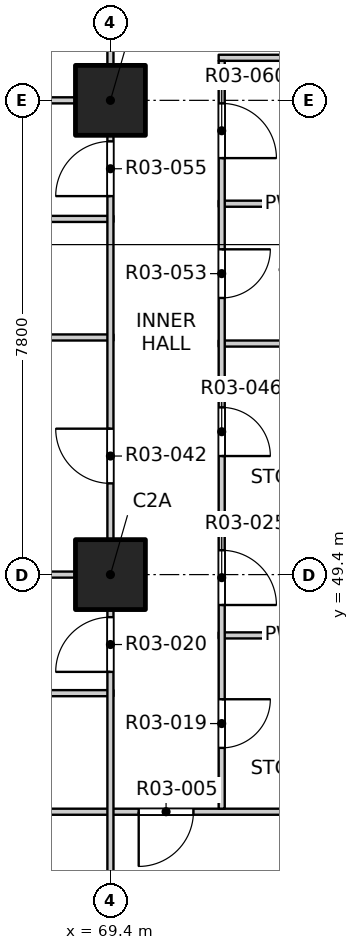
"""IFC4 building model, lengths in metres.
Left out: names, types, materials, properties, quantities, classifications, styles, units other than length and angle.
Written with IfcOpenShell. Run it as: python <this file> out.ifc"""

import sys

from ifc_helpers import new_model, si_unit, direction, frame, frame_2d, origin, origin_2d, place, context, subcontext, project, spatial, rectangle, extrude, element, fill, save


model = new_model("IFC4")
c1 = context("Model", 3, precision=1e-05, world=origin(), true_north=direction((0.0, 1.0)))
c2 = subcontext(c1, "Body", "Model", "MODEL_VIEW")
j1 = project(units=[si_unit("LENGTHUNIT", "METRE"), si_unit("PLANEANGLEUNIT", "RADIAN")], contexts=[c1])
p1 = place(None, origin())
s1 = spatial("IfcSite", under=j1, at=p1, CompositionType="ELEMENT")
p2 = place(p1, origin())
s2 = spatial("IfcBuilding", under=s1, at=p2, CompositionType="ELEMENT")
p3 = place(p2, frame((0.0, 0.0, 43.3)))
s3 = spatial("IfcBuildingStorey", under=s2, at=p3, CompositionType="ELEMENT", Elevation=43.3)
for number, where, z_axis, x_axis in (
    (1, (69.4, 49.4, -0.25), (0.0, 0.0, 1.0), (1.0, 0.0, 0.0)),
    (2, (69.4, 57.2, -0.25), (0.0, 0.0, 1.0), (1.0, 0.0, 0.0)),
):
    element("IfcColumn", number, at=place(p3, frame(where, z_axis=z_axis, x_axis=x_axis)), inside=s3, PredefinedType="COLUMN", context=c2, shape_type="SweptSolid", body=[
        extrude(rectangle(XDim=1.15, YDim=1.15, at=origin_2d()), origin(), (0.0, 0.0, 1.0), 3.35),
    ])
p4 = place(p3, frame((61.9, 45.5, 0.0), z_axis=(0.0, 0.0, 1.0), x_axis=(1.0, 0.0, 0.0)))
e3 = element("IfcWall", 3, at=p4, inside=s3, PredefinedType="PARTITIONING", context=c2, shape_type="SweptSolid", body=[
    extrude(rectangle(XDim=11.5, YDim=0.1, at=frame_2d((5.75, 0.0))), origin(), (0.0, 0.0, 1.0), 3.1),
])
p5 = place(p4, frame((7.965, 0.0, 0.0)))
e4 = element("IfcOpeningElement", 4, at=p5, cuts=e3, PredefinedType="OPENING", context=c2, shape_type="SweptSolid", body=[
    extrude(rectangle(XDim=0.9, YDim=2.1, at=frame_2d((0.45, 1.05))), frame((0.0, 0.06, 0.0), z_axis=(0.0, -1.0, 0.0), x_axis=(1.0, 0.0, 0.0)), (0.0, 0.0, 1.0), 0.12),
])
p6 = place(p3, frame((65.75, 47.45, 0.0), z_axis=(0.0, 0.0, 1.0), x_axis=(1.0, 0.0, 0.0)))
e5 = element("IfcWall", 5, at=p6, inside=s3, PredefinedType="PARTITIONING", context=c2, shape_type="SweptSolid", body=[
    extrude(rectangle(XDim=3.7, YDim=0.1, at=frame_2d((1.85, 0.0))), origin(), (0.0, 0.0, 1.0), 3.1),
])
p7 = place(p3, frame((71.18, 48.4, 0.0), z_axis=(0.0, 0.0, 1.0), x_axis=(1.0, 0.0, 0.0)))
e6 = element("IfcWall", 6, at=p7, inside=s3, PredefinedType="PARTITIONING", context=c2, shape_type="SweptSolid", body=[
    extrude(rectangle(XDim=2.22, YDim=0.1, at=frame_2d((1.11, 0.0))), origin(), (0.0, 0.0, 1.0), 3.1),
])
p8 = place(p3, frame((61.9, 49.4, 0.0), z_axis=(0.0, 0.0, 1.0), x_axis=(1.0, 0.0, 0.0)))
e7 = element("IfcWall", 7, at=p8, inside=s3, PredefinedType="PARTITIONING", context=c2, shape_type="SweptSolid", body=[
    extrude(rectangle(XDim=7.55, YDim=0.1, at=frame_2d((3.775, 0.0))), origin(), (0.0, 0.0, 1.0), 3.1),
])
p9 = place(p3, frame((71.18, 50.3, 0.0), z_axis=(0.0, 0.0, 1.0), x_axis=(1.0, 0.0, 0.0)))
e8 = element("IfcWall", 8, at=p9, inside=s3, PredefinedType="PARTITIONING", context=c2, shape_type="SweptSolid", body=[
    extrude(rectangle(XDim=2.22, YDim=0.1, at=frame_2d((1.11, 0.0))), origin(), (0.0, 0.0, 1.0), 3.1),
])
p10 = place(p3, frame((71.18, 53.2, 0.0), z_axis=(0.0, 0.0, 1.0), x_axis=(1.0, 0.0, 0.0)))
e9 = element("IfcWall", 9, at=p10, inside=s3, PredefinedType="PARTITIONING", context=c2, shape_type="SweptSolid", body=[
    extrude(rectangle(XDim=2.02, YDim=0.1, at=frame_2d((1.01, 0.0))), origin(), (0.0, 0.0, 1.0), 3.1),
])
p11 = place(p3, frame((61.9, 53.3, 0.0), z_axis=(0.0, 0.0, 1.0), x_axis=(1.0, 0.0, 0.0)))
e10 = element("IfcWall", 10, at=p11, inside=s3, PredefinedType="PARTITIONING", context=c2, shape_type="SweptSolid", body=[
    extrude(rectangle(XDim=7.55, YDim=0.1, at=frame_2d((3.775, 0.0))), origin(), (0.0, 0.0, 1.0), 3.1),
])
p12 = place(p3, frame((65.75, 55.25, 0.0), z_axis=(0.0, 0.0, 1.0), x_axis=(1.0, 0.0, 0.0)))
e11 = element("IfcWall", 11, at=p12, inside=s3, PredefinedType="PARTITIONING", context=c2, shape_type="SweptSolid", body=[
    extrude(rectangle(XDim=3.7, YDim=0.1, at=frame_2d((1.85, 0.0))), origin(), (0.0, 0.0, 1.0), 3.1),
])
p13 = place(p3, frame((71.18, 55.5, 0.0), z_axis=(0.0, 0.0, 1.0), x_axis=(1.0, 0.0, 0.0)))
e12 = element("IfcWall", 12, at=p13, inside=s3, PredefinedType="PARTITIONING", context=c2, shape_type="SweptSolid", body=[
    extrude(rectangle(XDim=2.22, YDim=0.1, at=frame_2d((1.11, 0.0))), origin(), (0.0, 0.0, 1.0), 3.1),
])
p14 = place(p3, frame((61.9, 57.2, 0.0), z_axis=(0.0, 0.0, 1.0), x_axis=(1.0, 0.0, 0.0)))
e13 = element("IfcWall", 13, at=p14, inside=s3, PredefinedType="PARTITIONING", context=c2, shape_type="SweptSolid", body=[
    extrude(rectangle(XDim=7.55, YDim=0.1, at=frame_2d((3.775, 0.0))), origin(), (0.0, 0.0, 1.0), 3.1),
])
p15 = place(p3, frame((71.18, 57.9, 0.0), z_axis=(0.0, 0.0, 1.0), x_axis=(1.0, 0.0, 0.0)))
e14 = element("IfcWall", 14, at=p15, inside=s3, PredefinedType="PARTITIONING", context=c2, shape_type="SweptSolid", body=[
    extrude(rectangle(XDim=2.22, YDim=0.1, at=frame_2d((1.11, 0.0))), origin(), (0.0, 0.0, 1.0), 3.1),
])
p16 = place(p3, frame((69.4, 41.9, 0.0), z_axis=(0.0, 0.0, 1.0), x_axis=(0.0, 1.0, 0.0)))
e15 = element("IfcWall", 15, at=p16, inside=s3, PredefinedType="PARTITIONING", context=c2, shape_type="SweptSolid", body=[
    extrude(rectangle(XDim=46.2, YDim=0.1, at=frame_2d((23.1, 0.0))), origin(), (0.0, 0.0, 1.0), 3.1),
])
p17 = place(p16, frame((1.2, 0.0, 0.0)))
e16 = element("IfcOpeningElement", 16, at=p17, cuts=e15, PredefinedType="OPENING", context=c2, shape_type="SweptSolid", body=[
    extrude(rectangle(XDim=0.9, YDim=2.1, at=frame_2d((0.45, 1.05))), frame((0.0, 0.06, 0.0), z_axis=(0.0, -1.0, 0.0), x_axis=(1.0, 0.0, 0.0)), (0.0, 0.0, 1.0), 0.12),
])
p18 = place(p16, frame((5.9, 0.0, 0.0)))
e17 = element("IfcOpeningElement", 17, at=p18, cuts=e15, PredefinedType="OPENING", context=c2, shape_type="SweptSolid", body=[
    extrude(rectangle(XDim=0.9, YDim=2.1, at=frame_2d((0.45, 1.05))), frame((0.0, 0.06, 0.0), z_axis=(0.0, -1.0, 0.0), x_axis=(1.0, 0.0, 0.0)), (0.0, 0.0, 1.0), 0.12),
])
p19 = place(p16, frame((9.0, 0.0, 0.0)))
e18 = element("IfcOpeningElement", 18, at=p19, cuts=e15, PredefinedType="OPENING", context=c2, shape_type="SweptSolid", body=[
    extrude(rectangle(XDim=0.9, YDim=2.1, at=frame_2d((0.45, 1.05))), frame((0.0, 0.06, 0.0), z_axis=(0.0, -1.0, 0.0), x_axis=(1.0, 0.0, 0.0)), (0.0, 0.0, 1.0), 0.12),
])
p20 = place(p16, frame((13.725, 0.0, 0.0)))
e19 = element("IfcOpeningElement", 19, at=p20, cuts=e15, PredefinedType="OPENING", context=c2, shape_type="SweptSolid", body=[
    extrude(rectangle(XDim=0.9, YDim=2.1, at=frame_2d((0.45, 1.05))), frame((0.0, 0.06, 0.0), z_axis=(0.0, -1.0, 0.0), x_axis=(1.0, 0.0, 0.0)), (0.0, 0.0, 1.0), 0.12),
])
p21 = place(p16, frame((17.775, 0.0, 0.0)))
e20 = element("IfcOpeningElement", 20, at=p21, cuts=e15, PredefinedType="OPENING", context=c2, shape_type="SweptSolid", body=[
    extrude(rectangle(XDim=0.9, YDim=2.1, at=frame_2d((0.45, 1.05))), frame((0.0, 0.06, 0.0), z_axis=(0.0, -1.0, 0.0), x_axis=(1.0, 0.0, 0.0)), (0.0, 0.0, 1.0), 0.12),
])
p22 = place(p16, frame((20.7, 0.0, 0.0)))
e21 = element("IfcOpeningElement", 21, at=p22, cuts=e15, PredefinedType="OPENING", context=c2, shape_type="SweptSolid", body=[
    extrude(rectangle(XDim=0.9, YDim=2.1, at=frame_2d((0.45, 1.05))), frame((0.0, 0.06, 0.0), z_axis=(0.0, -1.0, 0.0), x_axis=(1.0, 0.0, 0.0)), (0.0, 0.0, 1.0), 0.12),
])
p23 = place(p16, frame((25.575, 0.0, 0.0)))
e22 = element("IfcOpeningElement", 22, at=p23, cuts=e15, PredefinedType="OPENING", context=c2, shape_type="SweptSolid", body=[
    extrude(rectangle(XDim=0.9, YDim=2.1, at=frame_2d((0.45, 1.05))), frame((0.0, 0.06, 0.0), z_axis=(0.0, -1.0, 0.0), x_axis=(1.0, 0.0, 0.0)), (0.0, 0.0, 1.0), 0.12),
])
p24 = place(p16, frame((28.5, 0.0, 0.0)))
e23 = element("IfcOpeningElement", 23, at=p24, cuts=e15, PredefinedType="OPENING", context=c2, shape_type="SweptSolid", body=[
    extrude(rectangle(XDim=0.9, YDim=2.1, at=frame_2d((0.45, 1.05))), frame((0.0, 0.06, 0.0), z_axis=(0.0, -1.0, 0.0), x_axis=(1.0, 0.0, 0.0)), (0.0, 0.0, 1.0), 0.12),
])
p25 = place(p16, frame((33.375, 0.0, 0.0)))
e24 = element("IfcOpeningElement", 24, at=p25, cuts=e15, PredefinedType="OPENING", context=c2, shape_type="SweptSolid", body=[
    extrude(rectangle(XDim=0.9, YDim=2.1, at=frame_2d((0.45, 1.05))), frame((0.0, 0.06, 0.0), z_axis=(0.0, -1.0, 0.0), x_axis=(1.0, 0.0, 0.0)), (0.0, 0.0, 1.0), 0.12),
])
p26 = place(p16, frame((36.3, 0.0, 0.0)))
e25 = element("IfcOpeningElement", 25, at=p26, cuts=e15, PredefinedType="OPENING", context=c2, shape_type="SweptSolid", body=[
    extrude(rectangle(XDim=0.9, YDim=2.1, at=frame_2d((0.45, 1.05))), frame((0.0, 0.06, 0.0), z_axis=(0.0, -1.0, 0.0), x_axis=(1.0, 0.0, 0.0)), (0.0, 0.0, 1.0), 0.12),
])
p27 = place(p16, frame((40.2, 0.0, 0.0)))
e26 = element("IfcOpeningElement", 26, at=p27, cuts=e15, PredefinedType="OPENING", context=c2, shape_type="SweptSolid", body=[
    extrude(rectangle(XDim=0.9, YDim=2.1, at=frame_2d((0.45, 1.05))), frame((0.0, 0.06, 0.0), z_axis=(0.0, -1.0, 0.0), x_axis=(1.0, 0.0, 0.0)), (0.0, 0.0, 1.0), 0.12),
])
p28 = place(p16, frame((44.1, 0.0, 0.0)))
e27 = element("IfcOpeningElement", 27, at=p28, cuts=e15, PredefinedType="OPENING", context=c2, shape_type="SweptSolid", body=[
    extrude(rectangle(XDim=0.9, YDim=2.1, at=frame_2d((0.45, 1.05))), frame((0.0, 0.06, 0.0), z_axis=(0.0, -1.0, 0.0), x_axis=(1.0, 0.0, 0.0)), (0.0, 0.0, 1.0), 0.12),
])
p29 = place(p3, frame((71.23, 45.55, 0.0), z_axis=(0.0, 0.0, 1.0), x_axis=(0.0, 1.0, 0.0)))
e28 = element("IfcWall", 28, at=p29, inside=s3, PredefinedType="PARTITIONING", context=c2, shape_type="SweptSolid", body=[
    extrude(rectangle(XDim=12.3, YDim=0.1, at=frame_2d((6.15, 0.0))), origin(), (0.0, 0.0, 1.0), 3.1),
])
p30 = place(p29, frame((1.0, 0.0, 0.0)))
e29 = element("IfcOpeningElement", 29, at=p30, cuts=e28, PredefinedType="OPENING", context=c2, shape_type="SweptSolid", body=[
    extrude(rectangle(XDim=0.8, YDim=2.1, at=frame_2d((0.4, 1.05))), frame((0.0, 0.06, 0.0), z_axis=(0.0, -1.0, 0.0), x_axis=(1.0, 0.0, 0.0)), (0.0, 0.0, 1.0), 0.12),
])
p31 = place(p29, frame((3.35, 0.0, 0.0)))
e30 = element("IfcOpeningElement", 30, at=p31, cuts=e28, PredefinedType="OPENING", context=c2, shape_type="SweptSolid", body=[
    extrude(rectangle(XDim=0.9, YDim=2.1, at=frame_2d((0.45, 1.05))), frame((0.0, 0.06, 0.0), z_axis=(0.0, -1.0, 0.0), x_axis=(1.0, 0.0, 0.0)), (0.0, 0.0, 1.0), 0.12),
])
p32 = place(p29, frame((5.8, 0.0, 0.0)))
e31 = element("IfcOpeningElement", 31, at=p32, cuts=e28, PredefinedType="OPENING", context=c2, shape_type="SweptSolid", body=[
    extrude(rectangle(XDim=0.8, YDim=2.1, at=frame_2d((0.4, 1.05))), frame((0.0, 0.06, 0.0), z_axis=(0.0, -1.0, 0.0), x_axis=(1.0, 0.0, 0.0)), (0.0, 0.0, 1.0), 0.12),
])
p33 = place(p29, frame((8.4, 0.0, 0.0)))
e32 = element("IfcOpeningElement", 32, at=p33, cuts=e28, PredefinedType="OPENING", context=c2, shape_type="SweptSolid", body=[
    extrude(rectangle(XDim=0.8, YDim=2.1, at=frame_2d((0.4, 1.05))), frame((0.0, 0.06, 0.0), z_axis=(0.0, -1.0, 0.0), x_axis=(1.0, 0.0, 0.0)), (0.0, 0.0, 1.0), 0.12),
])
p34 = place(p29, frame((10.7, 0.0, 0.0)))
e33 = element("IfcOpeningElement", 33, at=p34, cuts=e28, PredefinedType="OPENING", context=c2, shape_type="SweptSolid", body=[
    extrude(rectangle(XDim=0.9, YDim=2.1, at=frame_2d((0.45, 1.05))), frame((0.0, 0.06, 0.0), z_axis=(0.0, -1.0, 0.0), x_axis=(1.0, 0.0, 0.0)), (0.0, 0.0, 1.0), 0.12),
])
p35 = place(p5, origin())
e34 = element("IfcDoor", 34, at=p35, inside=s3, OperationType="SINGLE_SWING_RIGHT", PredefinedType="DOOR", context=c2, shape_type="SweptSolid", body=[
    extrude(rectangle(XDim=0.9, YDim=2.1, at=frame_2d((0.45, 1.05))), frame((0.0, 0.025, 0.0), z_axis=(0.0, -1.0, 0.0), x_axis=(1.0, 0.0, 0.0)), (0.0, 0.0, 1.0), 0.05),
])
fill(e4, e34)
p36 = place(p30, origin())
e35 = element("IfcDoor", 35, at=p36, inside=s3, OperationType="SINGLE_SWING_LEFT", PredefinedType="DOOR", context=c2, shape_type="SweptSolid", body=[
    extrude(rectangle(XDim=0.8, YDim=2.1, at=frame_2d((0.4, 1.05))), frame((0.0, 0.025, 0.0), z_axis=(0.0, -1.0, 0.0), x_axis=(1.0, 0.0, 0.0)), (0.0, 0.0, 1.0), 0.05),
])
fill(e29, e35)
p37 = place(p18, origin())
e36 = element("IfcDoor", 36, at=p37, inside=s3, OperationType="SINGLE_SWING_LEFT", PredefinedType="DOOR", context=c2, shape_type="SweptSolid", body=[
    extrude(rectangle(XDim=0.9, YDim=2.1, at=frame_2d((0.45, 1.05))), frame((0.0, 0.025, 0.0), z_axis=(0.0, -1.0, 0.0), x_axis=(1.0, 0.0, 0.0)), (0.0, 0.0, 1.0), 0.05),
])
fill(e17, e36)
p38 = place(p31, origin())
e37 = element("IfcDoor", 37, at=p38, inside=s3, OperationType="SINGLE_SWING_RIGHT", PredefinedType="DOOR", context=c2, shape_type="SweptSolid", body=[
    extrude(rectangle(XDim=0.9, YDim=2.1, at=frame_2d((0.45, 1.05))), frame((0.0, 0.025, 0.0), z_axis=(0.0, -1.0, 0.0), x_axis=(1.0, 0.0, 0.0)), (0.0, 0.0, 1.0), 0.05),
])
fill(e30, e37)
p39 = place(p19, origin())
e38 = element("IfcDoor", 38, at=p39, inside=s3, OperationType="SINGLE_SWING_RIGHT", PredefinedType="DOOR", context=c2, shape_type="SweptSolid", body=[
    extrude(rectangle(XDim=0.9, YDim=2.1, at=frame_2d((0.45, 1.05))), frame((0.0, 0.025, 0.0), z_axis=(0.0, -1.0, 0.0), x_axis=(1.0, 0.0, 0.0)), (0.0, 0.0, 1.0), 0.05),
])
fill(e18, e38)
p40 = place(p32, origin())
e39 = element("IfcDoor", 39, at=p40, inside=s3, OperationType="SINGLE_SWING_RIGHT", PredefinedType="DOOR", context=c2, shape_type="SweptSolid", body=[
    extrude(rectangle(XDim=0.8, YDim=2.1, at=frame_2d((0.4, 1.05))), frame((0.0, 0.025, 0.0), z_axis=(0.0, -1.0, 0.0), x_axis=(1.0, 0.0, 0.0)), (0.0, 0.0, 1.0), 0.05),
])
fill(e31, e39)
p41 = place(p33, origin())
e40 = element("IfcDoor", 40, at=p41, inside=s3, OperationType="SINGLE_SWING_LEFT", PredefinedType="DOOR", context=c2, shape_type="SweptSolid", body=[
    extrude(rectangle(XDim=0.8, YDim=2.1, at=frame_2d((0.4, 1.05))), frame((0.0, 0.025, 0.0), z_axis=(0.0, -1.0, 0.0), x_axis=(1.0, 0.0, 0.0)), (0.0, 0.0, 1.0), 0.05),
])
fill(e32, e40)
p42 = place(p20, origin())
e41 = element("IfcDoor", 41, at=p42, inside=s3, OperationType="SINGLE_SWING_LEFT", PredefinedType="DOOR", context=c2, shape_type="SweptSolid", body=[
    extrude(rectangle(XDim=0.9, YDim=2.1, at=frame_2d((0.45, 1.05))), frame((0.0, 0.025, 0.0), z_axis=(0.0, -1.0, 0.0), x_axis=(1.0, 0.0, 0.0)), (0.0, 0.0, 1.0), 0.05),
])
fill(e19, e41)
p43 = place(p34, origin())
e42 = element("IfcDoor", 42, at=p43, inside=s3, OperationType="SINGLE_SWING_RIGHT", PredefinedType="DOOR", context=c2, shape_type="SweptSolid", body=[
    extrude(rectangle(XDim=0.9, YDim=2.1, at=frame_2d((0.45, 1.05))), frame((0.0, 0.025, 0.0), z_axis=(0.0, -1.0, 0.0), x_axis=(1.0, 0.0, 0.0)), (0.0, 0.0, 1.0), 0.05),
])
fill(e33, e42)
save(model, sys.argv[1])
